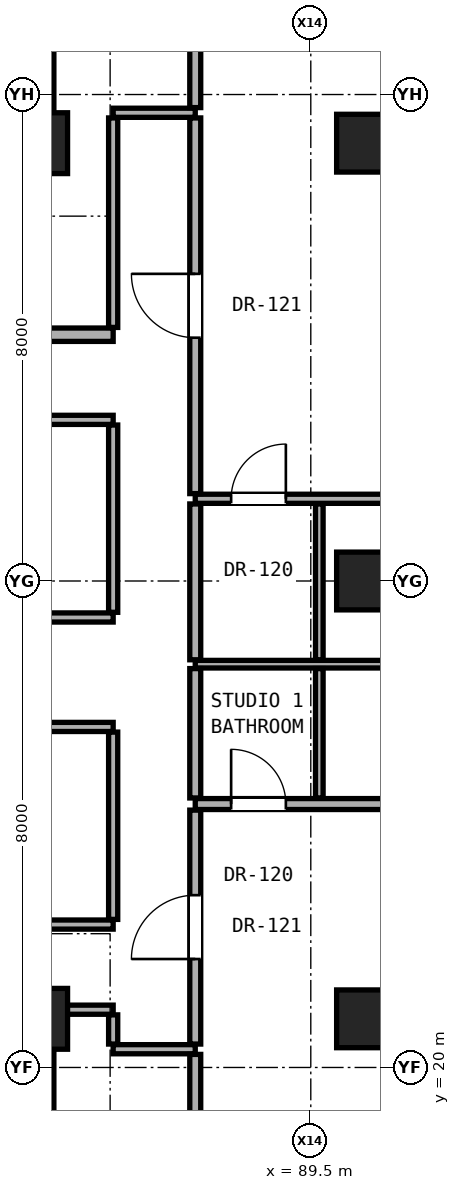
"""IFC4 building model, lengths in metres.
Left out: names, types, materials, properties, quantities, classifications, styles, units other than length and angle.
Written with IfcOpenShell. Run it as: python <this file> out.ifc"""

import sys

from ifc_helpers import new_model, si_unit, direction, frame, frame_2d, origin, origin_2d, place, context, subcontext, project, spatial, rectangle, hollow_rectangle, extrude, element, fill, save


model = new_model("IFC4")
c1 = context("Model", 3, precision=1e-05, world=origin(), true_north=direction((0.0, 1.0)))
c2 = subcontext(c1, "Body", "Model", "MODEL_VIEW")
j1 = project(units=[si_unit("LENGTHUNIT", "METRE"), si_unit("PLANEANGLEUNIT", "RADIAN")], contexts=[c1])
p1 = place(None, origin())
s1 = spatial("IfcSite", under=j1, at=p1, CompositionType="ELEMENT")
p2 = place(p1, origin())
s2 = spatial("IfcBuilding", under=s1, at=p2, CompositionType="ELEMENT")
p3 = place(p2, frame((0.0, 0.0, 177.15)))
s3 = spatial("IfcBuildingStorey", under=s2, at=p3, CompositionType="ELEMENT", Elevation=177.15)
for number, where, z_axis, x_axis in (
    (1, (85.0, 20.8, 0.0), (0.0, 0.0, 1.0), (1.0, 0.0, 0.0)),
    (2, (85.0, 35.2, 0.0), (0.0, 0.0, 1.0), (1.0, 0.0, 0.0)),
):
    element("IfcColumn", number, at=place(p3, frame(where, z_axis=z_axis, x_axis=x_axis)), inside=s3, PredefinedType="COLUMN", context=c2, shape_type="SweptSolid", body=[
        extrude(rectangle(XDim=1.0, YDim=1.0, at=origin_2d()), origin(), (0.0, 0.0, 1.0), 3.25),
    ])
for number, where, z_axis, x_axis in (
    (3, (90.4, 20.8, 0.0), (0.0, 0.0, 1.0), (1.0, 0.0, 0.0)),
    (4, (90.4, 28.0, 0.0), (0.0, 0.0, 1.0), (1.0, 0.0, 0.0)),
    (5, (90.4, 35.2, 0.0), (0.0, 0.0, 1.0), (1.0, 0.0, 0.0)),
):
    element("IfcColumn", number, at=place(p3, frame(where, z_axis=z_axis, x_axis=x_axis)), inside=s3, PredefinedType="COLUMN", context=c2, shape_type="SweptSolid", body=[
        extrude(hollow_rectangle(XDim=0.95, YDim=0.95, WallThickness=0.05, at=origin_2d()), origin(), (0.0, 0.0, 1.0), 3.25),
    ])
for number, where, z_axis, x_axis in (
    (6, (85.0, 35.2, 0.0), (0.0, 0.0, 1.0), (0.0, 1.0, 0.0)),
    (7, (85.0, 15.2, 0.0), (0.0, 0.0, 1.0), (0.0, 1.0, 0.0)),
):
    element("IfcWall", number, at=place(p3, frame(where, z_axis=z_axis, x_axis=x_axis)), inside=s3, PredefinedType="SHEAR", context=c2, shape_type="SweptSolid", body=[
        extrude(rectangle(XDim=5.6, YDim=0.55, at=frame_2d((2.8, 0.0))), origin(), (0.0, 0.0, 1.0), 3.05),
    ])
p4 = place(p3, frame((86.25, 20.3, 0.0), z_axis=(0.0, 0.0, 1.0), x_axis=(1.0, 0.0, 0.0)))
e8 = element("IfcWall", 8, at=p4, inside=s3, PredefinedType="PARTITIONING", context=c2, shape_type="SweptSolid", body=[
    extrude(rectangle(XDim=1.35, YDim=0.15, at=frame_2d((0.675, 0.0))), origin(), (0.0, 0.0, 1.0), 3.05),
])
p5 = place(p3, frame((85.27, 20.95, 0.0), z_axis=(0.0, 0.0, 1.0), x_axis=(1.0, 0.0, 0.0)))
e9 = element("IfcWall", 9, at=p5, inside=s3, PredefinedType="PARTITIONING", context=c2, shape_type="SweptSolid", body=[
    extrude(rectangle(XDim=0.98, YDim=0.15, at=frame_2d((0.49, 0.0))), origin(), (0.0, 0.0, 1.0), 2.442),
])
p6 = place(p3, frame((78.64, 22.35, 0.0), z_axis=(0.0, 0.0, 1.0), x_axis=(1.0, 0.0, 0.0)))
e10 = element("IfcWall", 10, at=p6, inside=s3, PredefinedType="PARTITIONING", context=c2, shape_type="SweptSolid", body=[
    extrude(rectangle(XDim=7.61, YDim=0.15, at=frame_2d((3.805, 0.0))), origin(), (0.0, 0.0, 1.0), 2.186),
])
p7 = place(p6, frame((3.33, 0.0, 0.0)))
e11 = element("IfcOpeningElement", 11, at=p7, cuts=e10, PredefinedType="OPENING", context=c2, shape_type="SweptSolid", body=[
    extrude(rectangle(XDim=0.95, YDim=2.15, at=frame_2d((0.475, 1.075))), frame((0.0, 0.085, 0.0), z_axis=(0.0, -1.0, 0.0), x_axis=(1.0, 0.0, 0.0)), (0.0, 0.0, 1.0), 0.17),
])
p8 = place(p3, frame((87.6, 24.332, 0.0), z_axis=(0.0, 0.0, 1.0), x_axis=(1.0, 0.0, 0.0)))
e12 = element("IfcWall", 12, at=p8, inside=s3, PredefinedType="PARTITIONING", context=c2, shape_type="SweptSolid", body=[
    extrude(rectangle(XDim=7.199, YDim=0.18, at=frame_2d((3.6, 0.0))), origin(), (0.0, 0.0, 1.0), 2.269),
])
p9 = place(p8, frame((4.125, 0.0, 0.0)))
e13 = element("IfcOpeningElement", 13, at=p9, cuts=e12, PredefinedType="OPENING", context=c2, shape_type="SweptSolid", body=[
    extrude(rectangle(XDim=0.95, YDim=2.15, at=frame_2d((0.475, 1.075))), frame((0.0, 0.1, 0.0), z_axis=(0.0, -1.0, 0.0), x_axis=(1.0, 0.0, 0.0)), (0.0, 0.0, 1.0), 0.2),
])
p10 = place(p8, frame((0.59, 0.0, 0.0)))
e14 = element("IfcOpeningElement", 14, at=p10, cuts=e12, PredefinedType="OPENING", context=c2, shape_type="SweptSolid", body=[
    extrude(rectangle(XDim=0.9, YDim=2.1, at=frame_2d((0.45, 1.05))), frame((0.0, 0.1, 0.0), z_axis=(0.0, -1.0, 0.0), x_axis=(1.0, 0.0, 0.0)), (0.0, 0.0, 1.0), 0.2),
])
p11 = place(p3, frame((78.6, 25.6, 0.0), z_axis=(0.0, 0.0, 1.0), x_axis=(1.0, 0.0, 0.0)))
e15 = element("IfcWall", 15, at=p11, inside=s3, PredefinedType="PARTITIONING", context=c2, shape_type="SweptSolid", body=[
    extrude(rectangle(XDim=7.65, YDim=0.15, at=frame_2d((3.825, 0.0))), origin(), (0.0, 0.0, 1.0), 2.186),
])
p12 = place(p3, frame((87.6, 26.632, 0.0), z_axis=(0.0, 0.0, 1.0), x_axis=(1.0, 0.0, 0.0)))
e16 = element("IfcWall", 16, at=p12, inside=s3, PredefinedType="PARTITIONING", context=c2, shape_type="SweptSolid", body=[
    extrude(rectangle(XDim=7.199, YDim=0.125, at=frame_2d((3.6, 0.0))), origin(), (0.0, 0.0, 1.0), 2.269),
])
p13 = place(p3, frame((78.6, 27.4, 0.0), z_axis=(0.0, 0.0, 1.0), x_axis=(1.0, 0.0, 0.0)))
e17 = element("IfcWall", 17, at=p13, inside=s3, PredefinedType="PARTITIONING", context=c2, shape_type="SweptSolid", body=[
    extrude(rectangle(XDim=7.65, YDim=0.15, at=frame_2d((3.825, 0.0))), origin(), (0.0, 0.0, 1.0), 2.186),
])
p14 = place(p3, frame((87.6, 29.352, 0.0), z_axis=(0.0, 0.0, 1.0), x_axis=(1.0, 0.0, 0.0)))
e18 = element("IfcWall", 18, at=p14, inside=s3, PredefinedType="PARTITIONING", context=c2, shape_type="SweptSolid", body=[
    extrude(rectangle(XDim=7.199, YDim=0.15, at=frame_2d((3.6, 0.0))), origin(), (0.0, 0.0, 1.0), 2.269),
])
p15 = place(p14, frame((4.125, 0.0, 0.0)))
e19 = element("IfcOpeningElement", 19, at=p15, cuts=e18, PredefinedType="OPENING", context=c2, shape_type="SweptSolid", body=[
    extrude(rectangle(XDim=0.95, YDim=2.15, at=frame_2d((0.475, 1.075))), frame((0.0, 0.085, 0.0), z_axis=(0.0, -1.0, 0.0), x_axis=(1.0, 0.0, 0.0)), (0.0, 0.0, 1.0), 0.17),
])
p16 = place(p14, frame((0.59, 0.0, 0.0)))
e20 = element("IfcOpeningElement", 20, at=p16, cuts=e18, PredefinedType="OPENING", context=c2, shape_type="SweptSolid", body=[
    extrude(rectangle(XDim=0.9, YDim=2.1, at=frame_2d((0.45, 1.05))), frame((0.0, 0.085, 0.0), z_axis=(0.0, -1.0, 0.0), x_axis=(1.0, 0.0, 0.0)), (0.0, 0.0, 1.0), 0.17),
])
p17 = place(p3, frame((78.64, 30.65, 0.0), z_axis=(0.0, 0.0, 1.0), x_axis=(1.0, 0.0, 0.0)))
e21 = element("IfcWall", 21, at=p17, inside=s3, PredefinedType="PARTITIONING", context=c2, shape_type="SweptSolid", body=[
    extrude(rectangle(XDim=7.61, YDim=0.15, at=frame_2d((3.805, 0.0))), origin(), (0.0, 0.0, 1.0), 2.186),
])
p18 = place(p17, frame((3.33, 0.0, 0.0)))
e22 = element("IfcOpeningElement", 22, at=p18, cuts=e21, PredefinedType="OPENING", context=c2, shape_type="SweptSolid", body=[
    extrude(rectangle(XDim=0.95, YDim=2.15, at=frame_2d((0.475, 1.075))), frame((0.0, 0.085, 0.0), z_axis=(0.0, -1.0, 0.0), x_axis=(1.0, 0.0, 0.0)), (0.0, 0.0, 1.0), 0.17),
])
p19 = place(p3, frame((71.55, 32.05, 0.0), z_axis=(0.0, 0.0, 1.0), x_axis=(1.0, 0.0, 0.0)))
e23 = element("IfcWall", 23, at=p19, inside=s3, PredefinedType="SOLIDWALL", context=c2, shape_type="SweptSolid", body=[
    extrude(rectangle(XDim=14.7, YDim=0.22, at=frame_2d((7.35, 0.0))), origin(), (0.0, 0.0, 1.0), 2.186),
])
p20 = place(p19, frame((6.065, 0.0, 0.0)))
e24 = element("IfcOpeningElement", 24, at=p20, cuts=e23, PredefinedType="OPENING", context=c2, shape_type="SweptSolid", body=[
    extrude(rectangle(XDim=0.85, YDim=2.01, at=frame_2d((0.425, 1.005))), frame((0.0, 0.12, 0.0), z_axis=(0.0, -1.0, 0.0), x_axis=(1.0, 0.0, 0.0)), (0.0, 0.0, 1.0), 0.24),
])
p21 = place(p19, frame((10.535, 0.0, 0.0)))
e25 = element("IfcOpeningElement", 25, at=p21, cuts=e23, PredefinedType="OPENING", context=c2, shape_type="SweptSolid", body=[
    extrude(rectangle(XDim=0.95, YDim=2.15, at=frame_2d((0.475, 1.075))), frame((0.0, 0.12, 0.0), z_axis=(0.0, -1.0, 0.0), x_axis=(1.0, 0.0, 0.0)), (0.0, 0.0, 1.0), 0.24),
])
p22 = place(p19, frame((0.7, 0.0, 0.0)))
e26 = element("IfcOpeningElement", 26, at=p22, cuts=e23, PredefinedType="OPENING", context=c2, shape_type="SweptSolid", body=[
    extrude(rectangle(XDim=0.85, YDim=2.01, at=frame_2d((0.425, 1.005))), frame((0.0, 0.12, 0.0), z_axis=(0.0, -1.0, 0.0), x_axis=(1.0, 0.0, 0.0)), (0.0, 0.0, 1.0), 0.24),
])
p23 = place(p19, frame((2.55, 0.0, 0.0)))
e27 = element("IfcOpeningElement", 27, at=p23, cuts=e23, PredefinedType="OPENING", context=c2, shape_type="SweptSolid", body=[
    extrude(rectangle(XDim=0.85, YDim=2.01, at=frame_2d((0.425, 1.005))), frame((0.0, 0.12, 0.0), z_axis=(0.0, -1.0, 0.0), x_axis=(1.0, 0.0, 0.0)), (0.0, 0.0, 1.0), 0.24),
])
p24 = place(p3, frame((86.25, 35.7, 0.0), z_axis=(0.0, 0.0, 1.0), x_axis=(1.0, 0.0, 0.0)))
e28 = element("IfcWall", 28, at=p24, inside=s3, PredefinedType="PARTITIONING", context=c2, shape_type="SweptSolid", body=[
    extrude(rectangle(XDim=1.35, YDim=0.15, at=frame_2d((0.675, 0.0))), origin(), (0.0, 0.0, 1.0), 3.05),
])
p25 = place(p3, frame((86.25, 20.385, 0.0), z_axis=(0.0, 0.0, 1.0), x_axis=(0.0, 1.0, 0.0)))
e29 = element("IfcWall", 29, at=p25, inside=s3, PredefinedType="PARTITIONING", context=c2, shape_type="SweptSolid", body=[
    extrude(rectangle(XDim=0.48, YDim=0.15, at=frame_2d((0.24, 0.0))), origin(), (0.0, 0.0, 1.0), 2.442),
])
p26 = place(p3, frame((86.25, 22.435, 0.0), z_axis=(0.0, 0.0, 1.0), x_axis=(0.0, 1.0, 0.0)))
e30 = element("IfcWall", 30, at=p26, inside=s3, PredefinedType="PARTITIONING", context=c2, shape_type="SweptSolid", body=[
    extrude(rectangle(XDim=3.08, YDim=0.15, at=frame_2d((1.54, 0.0))), origin(), (0.0, 0.0, 1.0), 3.05),
])
p27 = place(p3, frame((86.25, 27.485, 0.0), z_axis=(0.0, 0.0, 1.0), x_axis=(0.0, 1.0, 0.0)))
e31 = element("IfcWall", 31, at=p27, inside=s3, PredefinedType="PARTITIONING", context=c2, shape_type="SweptSolid", body=[
    extrude(rectangle(XDim=3.08, YDim=0.15, at=frame_2d((1.54, 0.0))), origin(), (0.0, 0.0, 1.0), 2.346),
])
p28 = place(p3, frame((86.25, 32.17, 0.0), z_axis=(0.0, 0.0, 1.0), x_axis=(0.0, 1.0, 0.0)))
e32 = element("IfcWall", 32, at=p28, inside=s3, PredefinedType="PARTITIONING", context=c2, shape_type="SweptSolid", body=[
    extrude(rectangle(XDim=3.445, YDim=0.15, at=frame_2d((1.723, 0.0))), origin(), (0.0, 0.0, 1.0), 2.442),
])
p29 = place(p3, frame((87.6, 16.691, 0.0), z_axis=(0.0, 0.0, 1.0), x_axis=(0.0, 1.0, 0.0)))
e33 = element("IfcWall", 33, at=p29, inside=s3, PredefinedType="PARTITIONING", context=c2, shape_type="SweptSolid", body=[
    extrude(rectangle(XDim=3.524, YDim=0.18, at=frame_2d((1.762, 0.0))), origin(), (0.0, 0.0, 1.0), 2.493),
])
p30 = place(p3, frame((87.6, 20.385, 0.0), z_axis=(0.0, 0.0, 1.0), x_axis=(0.0, 1.0, 0.0)))
e34 = element("IfcWall", 34, at=p30, inside=s3, PredefinedType="PARTITIONING", context=c2, shape_type="SweptSolid", body=[
    extrude(rectangle(XDim=3.847, YDim=0.18, at=frame_2d((1.923, 0.0))), origin(), (0.0, 0.0, 1.0), 2.442),
])
p31 = place(p30, frame((1.398, 0.0, 0.0)))
e35 = element("IfcOpeningElement", 35, at=p31, cuts=e34, PredefinedType="OPENING", context=c2, shape_type="SweptSolid", body=[
    extrude(rectangle(XDim=1.05, YDim=2.2, at=frame_2d((0.525, 1.1))), frame((0.0, 0.1, 0.0), z_axis=(0.0, -1.0, 0.0), x_axis=(1.0, 0.0, 0.0)), (0.0, 0.0, 1.0), 0.2),
])
p32 = place(p3, frame((87.6, 24.432, 0.0), z_axis=(0.0, 0.0, 1.0), x_axis=(0.0, 1.0, 0.0)))
e36 = element("IfcWall", 36, at=p32, inside=s3, PredefinedType="PARTITIONING", context=c2, shape_type="SweptSolid", body=[
    extrude(rectangle(XDim=2.128, YDim=0.18, at=frame_2d((1.064, 0.0))), origin(), (0.0, 0.0, 1.0), 3.05),
])
p33 = place(p3, frame((87.6, 26.705, 0.0), z_axis=(0.0, 0.0, 1.0), x_axis=(0.0, 1.0, 0.0)))
e37 = element("IfcWall", 37, at=p33, inside=s3, PredefinedType="PARTITIONING", context=c2, shape_type="SweptSolid", body=[
    extrude(rectangle(XDim=2.562, YDim=0.18, at=frame_2d((1.281, 0.0))), origin(), (0.0, 0.0, 1.0), 2.346),
])
p34 = place(p3, frame((87.6, 29.437, 0.0), z_axis=(0.0, 0.0, 1.0), x_axis=(0.0, 1.0, 0.0)))
e38 = element("IfcWall", 38, at=p34, inside=s3, PredefinedType="PARTITIONING", context=c2, shape_type="SweptSolid", body=[
    extrude(rectangle(XDim=6.178, YDim=0.18, at=frame_2d((3.089, 0.0))), origin(), (0.0, 0.0, 1.0), 2.442),
])
p35 = place(p34, frame((2.564, 0.0, 0.0)))
e39 = element("IfcOpeningElement", 39, at=p35, cuts=e38, PredefinedType="OPENING", context=c2, shape_type="SweptSolid", body=[
    extrude(rectangle(XDim=1.05, YDim=2.2, at=frame_2d((0.525, 1.1))), frame((0.0, 0.1, 0.0), z_axis=(0.0, -1.0, 0.0), x_axis=(1.0, 0.0, 0.0)), (0.0, 0.0, 1.0), 0.2),
])
p36 = place(p3, frame((87.6, 35.785, 0.0), z_axis=(0.0, 0.0, 1.0), x_axis=(0.0, 1.0, 0.0)))
e40 = element("IfcWall", 40, at=p36, inside=s3, PredefinedType="PARTITIONING", context=c2, shape_type="SweptSolid", body=[
    extrude(rectangle(XDim=3.539, YDim=0.18, at=frame_2d((1.77, 0.0))), origin(), (0.0, 0.0, 1.0), 2.493),
])
p37 = place(p3, frame((89.64, 24.432, 0.0), z_axis=(0.0, 0.0, 1.0), x_axis=(0.0, 1.0, 0.0)))
e41 = element("IfcWall", 41, at=p37, inside=s3, PredefinedType="PARTITIONING", context=c2, shape_type="SweptSolid", body=[
    extrude(rectangle(XDim=2.128, YDim=0.125, at=frame_2d((1.064, 0.0))), origin(), (0.0, 0.0, 1.0), 3.05),
])
p38 = place(p3, frame((89.64, 26.705, 0.0), z_axis=(0.0, 0.0, 1.0), x_axis=(0.0, 1.0, 0.0)))
e42 = element("IfcWall", 42, at=p38, inside=s3, PredefinedType="PARTITIONING", context=c2, shape_type="SweptSolid", body=[
    extrude(rectangle(XDim=2.562, YDim=0.125, at=frame_2d((1.281, 0.0))), origin(), (0.0, 0.0, 1.0), 2.346),
])
p39 = place(p31, origin())
e43 = element("IfcDoor", 43, at=p39, inside=s3, OperationType="SINGLE_SWING_LEFT", PredefinedType="DOOR", context=c2, shape_type="SweptSolid", body=[
    extrude(rectangle(XDim=1.05, YDim=2.2, at=frame_2d((0.525, 1.1))), frame((0.0, 0.025, 0.0), z_axis=(0.0, -1.0, 0.0), x_axis=(1.0, 0.0, 0.0)), (0.0, 0.0, 1.0), 0.05),
])
fill(e35, e43)
p40 = place(p10, origin())
e44 = element("IfcDoor", 44, at=p40, inside=s3, OperationType="SINGLE_SWING_LEFT", PredefinedType="DOOR", context=c2, shape_type="SweptSolid", body=[
    extrude(rectangle(XDim=0.9, YDim=2.1, at=frame_2d((0.45, 1.05))), frame((0.0, 0.025, 0.0), z_axis=(0.0, -1.0, 0.0), x_axis=(1.0, 0.0, 0.0)), (0.0, 0.0, 1.0), 0.05),
])
fill(e14, e44)
p41 = place(p35, origin())
e45 = element("IfcDoor", 45, at=p41, inside=s3, OperationType="SINGLE_SWING_RIGHT", PredefinedType="DOOR", context=c2, shape_type="SweptSolid", body=[
    extrude(rectangle(XDim=1.05, YDim=2.2, at=frame_2d((0.525, 1.1))), frame((0.0, 0.025, 0.0), z_axis=(0.0, -1.0, 0.0), x_axis=(1.0, 0.0, 0.0)), (0.0, 0.0, 1.0), 0.05),
])
fill(e39, e45)
p42 = place(p16, origin())
e46 = element("IfcDoor", 46, at=p42, inside=s3, OperationType="SINGLE_SWING_RIGHT", PredefinedType="DOOR", context=c2, shape_type="SweptSolid", body=[
    extrude(rectangle(XDim=0.9, YDim=2.1, at=frame_2d((0.45, 1.05))), frame((0.0, 0.025, 0.0), z_axis=(0.0, -1.0, 0.0), x_axis=(1.0, 0.0, 0.0)), (0.0, 0.0, 1.0), 0.05),
])
fill(e20, e46)
save(model, sys.argv[1])
